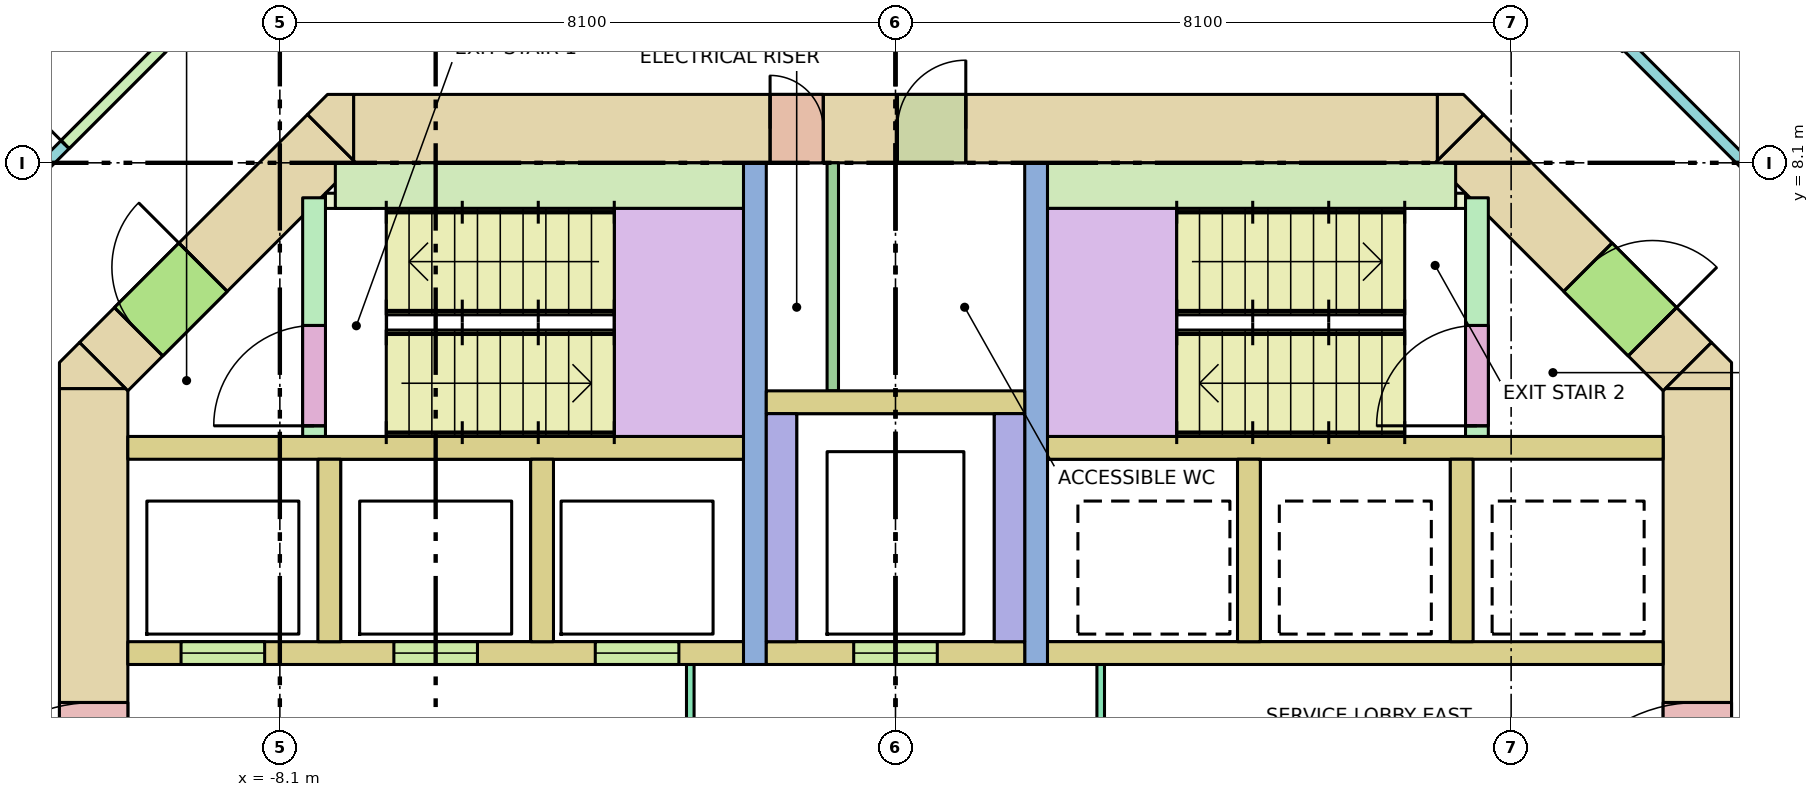
"""IFC4 building model, lengths in metres.
Left out: names, types, materials, properties, quantities, classifications, styles, units other than length and angle.
Written with IfcOpenShell. Run it as: python <this file> out.ifc"""

import sys

from ifc_helpers import new_model, si_unit, direction, frame, frame_2d, origin, place, context, subcontext, project, spatial, polyline, rectangle, outline, extrude, element, fill, save


model = new_model("IFC4")
c1 = context("Model", 3, precision=1e-05, world=origin(), true_north=direction((0.0, 1.0)))
c2 = subcontext(c1, "Body", "Model", "MODEL_VIEW")
j1 = project(units=[si_unit("LENGTHUNIT", "METRE"), si_unit("PLANEANGLEUNIT", "RADIAN")], contexts=[c1])
p1 = place(None, origin())
s1 = spatial("IfcSite", under=j1, at=p1, CompositionType="ELEMENT")
p2 = place(p1, origin())
s2 = spatial("IfcBuilding", under=s1, at=p2, CompositionType="ELEMENT")
p3 = place(p2, frame((0.0, 0.0, 139.0)))
s3 = spatial("IfcBuildingStorey", under=s2, at=p3, CompositionType="ELEMENT", Elevation=139.0)
p4 = place(p3, frame((-7.13, 8.55, -0.28), z_axis=(0.0, 0.0, 1.0), x_axis=(1.0, 0.0, 0.0)))
e1 = element("IfcWall", 1, at=p4, inside=s3, PredefinedType="SHEAR", context=c2, shape_type="SweptSolid", body=[
    extrude(rectangle(XDim=14.26, YDim=0.9, at=frame_2d((7.13, 0.0))), origin(), (0.0, 0.0, 1.0), 3.8),
])
p5 = place(p4, frame((5.48, 0.0, 0.28)))
e2 = element("IfcOpeningElement", 2, at=p5, cuts=e1, PredefinedType="OPENING", context=c2, shape_type="SweptSolid", body=[
    extrude(rectangle(XDim=0.7, YDim=2.1, at=frame_2d((0.35, 1.05))), frame((0.0, 0.46, 0.0), z_axis=(0.0, -1.0, 0.0), x_axis=(1.0, 0.0, 0.0)), (0.0, 0.0, 1.0), 0.92),
])
p6 = place(p4, frame((7.155, 0.0, 0.28)))
e3 = element("IfcOpeningElement", 3, at=p6, cuts=e1, PredefinedType="OPENING", context=c2, shape_type="SweptSolid", body=[
    extrude(rectangle(XDim=0.9, YDim=2.1, at=frame_2d((0.45, 1.05))), frame((0.0, 0.46, 0.0), z_axis=(0.0, -1.0, 0.0), x_axis=(1.0, 0.0, 0.0)), (0.0, 0.0, 1.0), 0.92),
])
p7 = place(p3, frame((-10.55, -5.13, -0.28), z_axis=(0.0, 0.0, 1.0), x_axis=(0.0, 1.0, 0.0)))
e4 = element("IfcWall", 4, at=p7, inside=s3, PredefinedType="SHEAR", context=c2, shape_type="SweptSolid", body=[
    extrude(rectangle(XDim=10.26, YDim=0.9, at=frame_2d((5.13, 0.0))), origin(), (0.0, 0.0, 1.0), 3.8),
])
p8 = place(p7, frame((4.13, 0.0, 0.28)))
e5 = element("IfcOpeningElement", 5, at=p8, cuts=e4, PredefinedType="OPENING", context=c2, shape_type="SweptSolid", body=[
    extrude(rectangle(XDim=2.0, YDim=2.1, at=frame_2d((1.0, 1.05))), frame((0.0, 0.46, 0.0), z_axis=(0.0, -1.0, 0.0), x_axis=(1.0, 0.0, 0.0)), (0.0, 0.0, 1.0), 0.92),
])
p9 = place(p3, frame((10.55, -5.13, -0.28), z_axis=(0.0, 0.0, 1.0), x_axis=(0.0, 1.0, 0.0)))
e6 = element("IfcWall", 6, at=p9, inside=s3, PredefinedType="SHEAR", context=c2, shape_type="SweptSolid", body=[
    extrude(rectangle(XDim=10.26, YDim=0.9, at=frame_2d((5.13, 0.0))), origin(), (0.0, 0.0, 1.0), 3.8),
])
p10 = place(p9, frame((4.13, 0.0, 0.28)))
e7 = element("IfcOpeningElement", 7, at=p10, cuts=e6, PredefinedType="OPENING", context=c2, shape_type="SweptSolid", body=[
    extrude(rectangle(XDim=2.0, YDim=2.1, at=frame_2d((1.0, 1.05))), frame((0.0, 0.46, 0.0), z_axis=(0.0, -1.0, 0.0), x_axis=(1.0, 0.0, 0.0)), (0.0, 0.0, 1.0), 0.92),
])
p11 = place(p3, frame((-10.418, 5.418, -0.28), z_axis=(0.0, 0.0, 1.0), x_axis=(0.707106781187, 0.707106781187, 0.0)))
e8 = element("IfcWall", 8, at=p11, inside=s3, PredefinedType="SHEAR", context=c2, shape_type="SweptSolid", body=[
    extrude(rectangle(XDim=4.243, YDim=0.9, at=frame_2d((2.121, 0.0))), origin(), (0.0, 0.0, 1.0), 3.8),
])
p12 = place(p11, frame((0.65, 0.0, 0.28)))
e9 = element("IfcOpeningElement", 9, at=p12, cuts=e8, PredefinedType="OPENING", context=c2, shape_type="SweptSolid", body=[
    extrude(rectangle(XDim=1.2, YDim=2.1, at=frame_2d((0.6, 1.05))), frame((0.0, 0.46, 0.0), z_axis=(0.0, -1.0, 0.0), x_axis=(1.0, 0.0, 0.0)), (0.0, 0.0, 1.0), 0.92),
])
p13 = place(p3, frame((7.418, 8.418, -0.28), z_axis=(0.0, 0.0, 1.0), x_axis=(0.707106781187, -0.707106781187, 0.0)))
e10 = element("IfcWall", 10, at=p13, inside=s3, PredefinedType="SHEAR", context=c2, shape_type="SweptSolid", body=[
    extrude(rectangle(XDim=4.243, YDim=0.9, at=frame_2d((2.121, 0.0))), origin(), (0.0, 0.0, 1.0), 3.8),
])
p14 = place(p13, frame((2.393, 0.0, 0.28)))
e11 = element("IfcOpeningElement", 11, at=p14, cuts=e10, PredefinedType="OPENING", context=c2, shape_type="SweptSolid", body=[
    extrude(rectangle(XDim=1.2, YDim=2.1, at=frame_2d((0.6, 1.05))), frame((0.0, 0.46, 0.0), z_axis=(0.0, -1.0, 0.0), x_axis=(1.0, 0.0, 0.0)), (0.0, 0.0, 1.0), 0.92),
])
p15 = place(p3, frame((0.0, 0.0, -0.28)))
e12 = element("IfcWall", 12, at=p15, inside=s3, PredefinedType="SHEAR", context=c2, shape_type="SweptSolid", body=[
    extrude(outline(polyline([(-10.736, 5.736), (-10.13, 5.13), (-11.0, 5.13), (-11.0, 5.473), (-10.736, 5.736)])), origin(), (0.0, 0.0, 1.0), 3.8),
])
p16 = place(p3, frame((0.0, 0.0, -0.28)))
e13 = element("IfcWall", 13, at=p16, inside=s3, PredefinedType="SHEAR", context=c2, shape_type="SweptSolid", body=[
    extrude(outline(polyline([(11.0, 5.473), (11.0, 5.13), (10.13, 5.13), (10.736, 5.736), (11.0, 5.473)])), origin(), (0.0, 0.0, 1.0), 3.8),
])
p17 = place(p3, frame((0.0, 0.0, -0.28)))
e14 = element("IfcWall", 14, at=p17, inside=s3, PredefinedType="SHEAR", context=c2, shape_type="SweptSolid", body=[
    extrude(outline(polyline([(-7.473, 9.0), (-7.13, 9.0), (-7.13, 8.13), (-7.736, 8.736), (-7.473, 9.0)])), origin(), (0.0, 0.0, 1.0), 3.8),
])
p18 = place(p3, frame((0.0, 0.0, -0.28)))
e15 = element("IfcWall", 15, at=p18, inside=s3, PredefinedType="SHEAR", context=c2, shape_type="SweptSolid", body=[
    extrude(outline(polyline([(7.473, 9.0), (7.736, 8.736), (7.13, 8.13), (7.13, 9.0), (7.473, 9.0)])), origin(), (0.0, 0.0, 1.0), 3.8),
])
for number, where, z_axis, x_axis in (
    (16, (-10.1, 4.35, 0.0), (0.0, 0.0, 1.0), (1.0, 0.0, 0.0)),
    (17, (2.0, 4.35, 0.0), (0.0, 0.0, 1.0), (1.0, 0.0, 0.0)),
):
    element("IfcWall", number, at=place(p3, frame(where, z_axis=z_axis, x_axis=x_axis)), inside=s3, PredefinedType="SOLIDWALL", context=c2, shape_type="SweptSolid", body=[
        extrude(rectangle(XDim=8.1, YDim=0.3, at=frame_2d((4.05, 0.0))), origin(), (0.0, 0.0, 1.0), 3.52),
    ])
p19 = place(p3, frame((-10.1, 1.65, 0.0), z_axis=(0.0, 0.0, 1.0), x_axis=(1.0, 0.0, 0.0)))
e18 = element("IfcWall", 18, at=p19, inside=s3, PredefinedType="SOLIDWALL", context=c2, shape_type="SweptSolid", body=[
    extrude(rectangle(XDim=8.1, YDim=0.3, at=frame_2d((4.05, 0.0))), origin(), (0.0, 0.0, 1.0), 3.52),
])
p20 = place(p19, frame((0.7, 0.0, 0.0)))
e19 = element("IfcOpeningElement", 19, at=p20, cuts=e18, PredefinedType="OPENING", context=c2, shape_type="SweptSolid", body=[
    extrude(rectangle(XDim=1.1, YDim=2.1, at=frame_2d((0.55, 1.05))), frame((0.0, 0.16, 0.0), z_axis=(0.0, -1.0, 0.0), x_axis=(1.0, 0.0, 0.0)), (0.0, 0.0, 1.0), 0.32),
])
p21 = place(p19, frame((3.5, 0.0, 0.0)))
e20 = element("IfcOpeningElement", 20, at=p21, cuts=e18, PredefinedType="OPENING", context=c2, shape_type="SweptSolid", body=[
    extrude(rectangle(XDim=1.1, YDim=2.1, at=frame_2d((0.55, 1.05))), frame((0.0, 0.16, 0.0), z_axis=(0.0, -1.0, 0.0), x_axis=(1.0, 0.0, 0.0)), (0.0, 0.0, 1.0), 0.32),
])
p22 = place(p19, frame((6.15, 0.0, 0.0)))
e21 = element("IfcOpeningElement", 21, at=p22, cuts=e18, PredefinedType="OPENING", context=c2, shape_type="SweptSolid", body=[
    extrude(rectangle(XDim=1.1, YDim=2.1, at=frame_2d((0.55, 1.05))), frame((0.0, 0.16, 0.0), z_axis=(0.0, -1.0, 0.0), x_axis=(1.0, 0.0, 0.0)), (0.0, 0.0, 1.0), 0.32),
])
p23 = place(p3, frame((2.0, 1.65, 0.0), z_axis=(0.0, 0.0, 1.0), x_axis=(1.0, 0.0, 0.0)))
e22 = element("IfcWall", 22, at=p23, inside=s3, PredefinedType="SOLIDWALL", context=c2, shape_type="SweptSolid", body=[
    extrude(rectangle(XDim=8.1, YDim=0.3, at=frame_2d((4.05, 0.0))), origin(), (0.0, 0.0, 1.0), 3.52),
])
for number, where, z_axis, x_axis in (
    (23, (-7.45, 1.8, 0.0), (0.0, 0.0, 1.0), (0.0, 1.0, 0.0)),
    (24, (-4.65, 1.8, 0.0), (0.0, 0.0, 1.0), (0.0, 1.0, 0.0)),
    (25, (4.65, 1.8, 0.0), (0.0, 0.0, 1.0), (0.0, 1.0, 0.0)),
    (26, (7.45, 1.8, 0.0), (0.0, 0.0, 1.0), (0.0, 1.0, 0.0)),
):
    element("IfcWall", number, at=place(p3, frame(where, z_axis=z_axis, x_axis=x_axis)), inside=s3, PredefinedType="SOLIDWALL", context=c2, shape_type="SweptSolid", body=[
        extrude(rectangle(XDim=2.4, YDim=0.3, at=frame_2d((1.2, 0.0))), origin(), (0.0, 0.0, 1.0), 3.52),
    ])
for number, where, z_axis, x_axis in (
    (27, (-1.85, 1.5, 0.0), (0.0, 0.0, 1.0), (0.0, 1.0, 0.0)),
    (28, (1.85, 1.5, 0.0), (0.0, 0.0, 1.0), (0.0, 1.0, 0.0)),
):
    element("IfcWall", number, at=place(p3, frame(where, z_axis=z_axis, x_axis=x_axis)), inside=s3, PredefinedType="SHEAR", context=c2, shape_type="SweptSolid", body=[
        extrude(rectangle(XDim=6.6, YDim=0.3, at=frame_2d((3.3, 0.0))), origin(), (0.0, 0.0, 1.0), 3.52),
    ])
p24 = place(p3, frame((-1.7, 1.65, 0.0), z_axis=(0.0, 0.0, 1.0), x_axis=(1.0, 0.0, 0.0)))
e29 = element("IfcWall", 29, at=p24, inside=s3, PredefinedType="SOLIDWALL", context=c2, shape_type="SweptSolid", body=[
    extrude(rectangle(XDim=3.4, YDim=0.3, at=frame_2d((1.7, 0.0))), origin(), (0.0, 0.0, 1.0), 3.52),
])
p25 = place(p24, frame((1.15, 0.0, 0.0)))
e30 = element("IfcOpeningElement", 30, at=p25, cuts=e29, PredefinedType="OPENING", context=c2, shape_type="SweptSolid", body=[
    extrude(rectangle(XDim=1.1, YDim=2.1, at=frame_2d((0.55, 1.05))), frame((0.0, 0.16, 0.0), z_axis=(0.0, -1.0, 0.0), x_axis=(1.0, 0.0, 0.0)), (0.0, 0.0, 1.0), 0.32),
])
for number, where, z_axis, x_axis in (
    (31, (-1.5, 1.8, 0.0), (0.0, 0.0, 1.0), (0.0, 1.0, 0.0)),
    (32, (1.5, 1.8, 0.0), (0.0, 0.0, 1.0), (0.0, 1.0, 0.0)),
):
    element("IfcWall", number, at=place(p3, frame(where, z_axis=z_axis, x_axis=x_axis)), inside=s3, PredefinedType="SOLIDWALL", context=c2, shape_type="SweptSolid", body=[
        extrude(rectangle(XDim=3.0, YDim=0.4, at=frame_2d((1.5, 0.0))), origin(), (0.0, 0.0, 1.0), 3.52),
    ])
p26 = place(p3, frame((-1.7, 4.95, 0.0), z_axis=(0.0, 0.0, 1.0), x_axis=(1.0, 0.0, 0.0)))
e33 = element("IfcWall", 33, at=p26, inside=s3, PredefinedType="SOLIDWALL", context=c2, shape_type="SweptSolid", body=[
    extrude(rectangle(XDim=3.4, YDim=0.3, at=frame_2d((1.7, 0.0))), origin(), (0.0, 0.0, 1.0), 3.52),
])
p27 = place(p3, frame((-7.65, 4.5, 0.0), z_axis=(0.0, 0.0, 1.0), x_axis=(0.0, 1.0, 0.0)))
e34 = element("IfcWall", 34, at=p27, inside=s3, PredefinedType="SHEAR", context=c2, shape_type="SweptSolid", body=[
    extrude(rectangle(XDim=3.14, YDim=0.3, at=frame_2d((1.57, 0.0))), origin(), (0.0, 0.0, 1.0), 3.52),
])
p28 = place(p27, frame((0.14, 0.0, 0.0)))
e35 = element("IfcOpeningElement", 35, at=p28, cuts=e34, PredefinedType="OPENING", context=c2, shape_type="SweptSolid", body=[
    extrude(rectangle(XDim=1.32, YDim=2.1, at=frame_2d((0.66, 1.05))), frame((0.0, 0.16, 0.0), z_axis=(0.0, -1.0, 0.0), x_axis=(1.0, 0.0, 0.0)), (0.0, 0.0, 1.0), 0.32),
])
p29 = place(p3, frame((-7.37, 7.8, 0.0), z_axis=(0.0, 0.0, 1.0), x_axis=(1.0, 0.0, 0.0)))
e36 = element("IfcWall", 36, at=p29, inside=s3, PredefinedType="SHEAR", context=c2, shape_type="SweptSolid", body=[
    extrude(rectangle(XDim=5.37, YDim=0.6, at=frame_2d((2.685, 0.0))), origin(), (0.0, 0.0, 1.0), 3.52),
])
p30 = place(p3, frame((7.65, 4.5, 0.0), z_axis=(0.0, 0.0, 1.0), x_axis=(0.0, 1.0, 0.0)))
e37 = element("IfcWall", 37, at=p30, inside=s3, PredefinedType="SHEAR", context=c2, shape_type="SweptSolid", body=[
    extrude(rectangle(XDim=3.14, YDim=0.3, at=frame_2d((1.57, 0.0))), origin(), (0.0, 0.0, 1.0), 3.52),
])
p31 = place(p30, frame((0.14, 0.0, 0.0)))
e38 = element("IfcOpeningElement", 38, at=p31, cuts=e37, PredefinedType="OPENING", context=c2, shape_type="SweptSolid", body=[
    extrude(rectangle(XDim=1.32, YDim=2.1, at=frame_2d((0.66, 1.05))), frame((0.0, 0.16, 0.0), z_axis=(0.0, -1.0, 0.0), x_axis=(1.0, 0.0, 0.0)), (0.0, 0.0, 1.0), 0.32),
])
p32 = place(p3, frame((2.0, 7.8, 0.0), z_axis=(0.0, 0.0, 1.0), x_axis=(1.0, 0.0, 0.0)))
e39 = element("IfcWall", 39, at=p32, inside=s3, PredefinedType="SHEAR", context=c2, shape_type="SweptSolid", body=[
    extrude(rectangle(XDim=5.37, YDim=0.6, at=frame_2d((2.685, 0.0))), origin(), (0.0, 0.0, 1.0), 3.52),
])
for number, where, z_axis, x_axis in (
    (40, (-7.5, 7.6, 0.0), (0.0, 0.0, 1.0), (1.0, 0.0, 0.0)),
    (41, (6.9, 7.6, 0.0), (0.0, 0.0, 1.0), (1.0, 0.0, 0.0)),
):
    element("IfcWall", number, at=place(p3, frame(where, z_axis=z_axis, x_axis=x_axis)), inside=s3, PredefinedType="SHEAR", context=c2, shape_type="SweptSolid", body=[
        extrude(rectangle(XDim=0.6, YDim=0.2, at=frame_2d((0.3, 0.0))), origin(), (0.0, 0.0, 1.0), 3.52),
    ])
p33 = place(p3, frame((-2.7, -1.5, 0.0), z_axis=(0.0, 0.0, 1.0), x_axis=(0.0, 1.0, 0.0)))
e42 = element("IfcWall", 42, at=p33, inside=s3, PredefinedType="PARTITIONING", context=c2, shape_type="SweptSolid", body=[
    extrude(rectangle(XDim=3.0, YDim=0.1, at=frame_2d((1.5, 0.0))), origin(), (0.0, 0.0, 1.0), 3.52),
])
p34 = place(p33, frame((0.9, 0.0, 0.0)))
e43 = element("IfcOpeningElement", 43, at=p34, cuts=e42, PredefinedType="OPENING", context=c2, shape_type="SweptSolid", body=[
    extrude(rectangle(XDim=1.2, YDim=2.1, at=frame_2d((0.6, 1.05))), frame((0.0, 0.06, 0.0), z_axis=(0.0, -1.0, 0.0), x_axis=(1.0, 0.0, 0.0)), (0.0, 0.0, 1.0), 0.12),
])
p35 = place(p3, frame((2.7, -1.5, 0.0), z_axis=(0.0, 0.0, 1.0), x_axis=(0.0, 1.0, 0.0)))
e44 = element("IfcWall", 44, at=p35, inside=s3, PredefinedType="PARTITIONING", context=c2, shape_type="SweptSolid", body=[
    extrude(rectangle(XDim=3.0, YDim=0.1, at=frame_2d((1.5, 0.0))), origin(), (0.0, 0.0, 1.0), 3.52),
])
p36 = place(p35, frame((0.9, 0.0, 0.0)))
e45 = element("IfcOpeningElement", 45, at=p36, cuts=e44, PredefinedType="OPENING", context=c2, shape_type="SweptSolid", body=[
    extrude(rectangle(XDim=1.2, YDim=2.1, at=frame_2d((0.6, 1.05))), frame((0.0, 0.06, 0.0), z_axis=(0.0, -1.0, 0.0), x_axis=(1.0, 0.0, 0.0)), (0.0, 0.0, 1.0), 0.12),
])
p37 = place(p3, frame((-0.825, 5.1, 0.0), z_axis=(0.0, 0.0, 1.0), x_axis=(0.0, 1.0, 0.0)))
e46 = element("IfcWall", 46, at=p37, inside=s3, PredefinedType="PARTITIONING", context=c2, shape_type="SweptSolid", body=[
    extrude(rectangle(XDim=3.0, YDim=0.15, at=frame_2d((1.5, 0.0))), origin(), (0.0, 0.0, 1.0), 3.52),
])
p38 = place(p3, frame((-12.975, 6.291, 0.0), z_axis=(0.0, 0.0, 1.0), x_axis=(0.707125355289, 0.707088206597, 0.0)))
e47 = element("IfcWall", 47, at=p38, inside=s3, PredefinedType="PARTITIONING", context=c2, shape_type="SweptSolid", body=[
    extrude(rectangle(XDim=6.572, YDim=0.15, at=frame_2d((3.286, 0.0))), origin(), (0.0, 0.0, 1.0), 2.67),
])
p39 = place(p38, frame((2.898, 0.0, 0.0)))
e48 = element("IfcOpeningElement", 48, at=p39, cuts=e47, PredefinedType="OPENING", context=c2, shape_type="SweptSolid", body=[
    extrude(rectangle(XDim=1.8, YDim=2.1, at=frame_2d((0.9, 1.05))), frame((0.0, 0.085, 0.0), z_axis=(0.0, -1.0, 0.0), x_axis=(1.0, 0.0, 0.0)), (0.0, 0.0, 1.0), 0.17),
])
p40 = place(p3, frame((9.633, 9.633, 0.0), z_axis=(0.0, 0.0, 1.0), x_axis=(0.707106781187, -0.707106781187, 0.0)))
e49 = element("IfcWall", 49, at=p40, inside=s3, PredefinedType="PARTITIONING", context=c2, shape_type="SweptSolid", body=[
    extrude(rectangle(XDim=2.335, YDim=0.15, at=frame_2d((1.168, 0.0))), origin(), (0.0, 0.0, 1.0), 2.67),
])
p41 = place(p20, origin())
e50 = element("IfcDoor", 50, at=p41, inside=s3, OperationType="DOUBLE_DOOR_SLIDING", PredefinedType="DOOR", context=c2, shape_type="SweptSolid", body=[
    extrude(rectangle(XDim=1.1, YDim=2.1, at=frame_2d((0.55, 1.05))), frame((0.0, 0.025, 0.0), z_axis=(0.0, -1.0, 0.0), x_axis=(1.0, 0.0, 0.0)), (0.0, 0.0, 1.0), 0.05),
])
fill(e19, e50)
p42 = place(p21, origin())
e51 = element("IfcDoor", 51, at=p42, inside=s3, OperationType="DOUBLE_DOOR_SLIDING", PredefinedType="DOOR", context=c2, shape_type="SweptSolid", body=[
    extrude(rectangle(XDim=1.1, YDim=2.1, at=frame_2d((0.55, 1.05))), frame((0.0, 0.025, 0.0), z_axis=(0.0, -1.0, 0.0), x_axis=(1.0, 0.0, 0.0)), (0.0, 0.0, 1.0), 0.05),
])
fill(e20, e51)
p43 = place(p22, origin())
e52 = element("IfcDoor", 52, at=p43, inside=s3, OperationType="DOUBLE_DOOR_SLIDING", PredefinedType="DOOR", context=c2, shape_type="SweptSolid", body=[
    extrude(rectangle(XDim=1.1, YDim=2.1, at=frame_2d((0.55, 1.05))), frame((0.0, 0.025, 0.0), z_axis=(0.0, -1.0, 0.0), x_axis=(1.0, 0.0, 0.0)), (0.0, 0.0, 1.0), 0.05),
])
fill(e21, e52)
p44 = place(p25, origin())
e53 = element("IfcDoor", 53, at=p44, inside=s3, OperationType="DOUBLE_DOOR_SLIDING", PredefinedType="DOOR", context=c2, shape_type="SweptSolid", body=[
    extrude(rectangle(XDim=1.1, YDim=2.1, at=frame_2d((0.55, 1.05))), frame((0.0, 0.025, 0.0), z_axis=(0.0, -1.0, 0.0), x_axis=(1.0, 0.0, 0.0)), (0.0, 0.0, 1.0), 0.05),
])
fill(e30, e53)
p45 = place(p28, origin())
e54 = element("IfcDoor", 54, at=p45, inside=s3, OperationType="DOUBLE_DOOR_SINGLE_SWING", PredefinedType="DOOR", context=c2, shape_type="SweptSolid", body=[
    extrude(rectangle(XDim=1.32, YDim=2.1, at=frame_2d((0.66, 1.05))), frame((0.0, 0.025, 0.0), z_axis=(0.0, -1.0, 0.0), x_axis=(1.0, 0.0, 0.0)), (0.0, 0.0, 1.0), 0.05),
])
fill(e35, e54)
p46 = place(p12, origin())
e55 = element("IfcDoor", 55, at=p46, inside=s3, OperationType="SINGLE_SWING_RIGHT", PredefinedType="DOOR", context=c2, shape_type="SweptSolid", body=[
    extrude(rectangle(XDim=1.2, YDim=2.1, at=frame_2d((0.6, 1.05))), frame((0.0, 0.025, 0.0), z_axis=(0.0, -1.0, 0.0), x_axis=(1.0, 0.0, 0.0)), (0.0, 0.0, 1.0), 0.05),
])
fill(e9, e55)
p47 = place(p31, origin())
e56 = element("IfcDoor", 56, at=p47, inside=s3, OperationType="DOUBLE_DOOR_SINGLE_SWING", PredefinedType="DOOR", context=c2, shape_type="SweptSolid", body=[
    extrude(rectangle(XDim=1.32, YDim=2.1, at=frame_2d((0.66, 1.05))), frame((0.0, 0.025, 0.0), z_axis=(0.0, -1.0, 0.0), x_axis=(1.0, 0.0, 0.0)), (0.0, 0.0, 1.0), 0.05),
])
fill(e38, e56)
p48 = place(p14, origin())
e57 = element("IfcDoor", 57, at=p48, inside=s3, OperationType="SINGLE_SWING_RIGHT", PredefinedType="DOOR", context=c2, shape_type="SweptSolid", body=[
    extrude(rectangle(XDim=1.2, YDim=2.1, at=frame_2d((0.6, 1.05))), frame((0.0, 0.025, 0.0), z_axis=(0.0, -1.0, 0.0), x_axis=(1.0, 0.0, 0.0)), (0.0, 0.0, 1.0), 0.05),
])
fill(e11, e57)
p49 = place(p8, origin())
e58 = element("IfcDoor", 58, at=p49, inside=s3, OperationType="DOUBLE_DOOR_SINGLE_SWING", PredefinedType="DOOR", context=c2, shape_type="SweptSolid", body=[
    extrude(rectangle(XDim=2.0, YDim=2.1, at=frame_2d((1.0, 1.05))), frame((0.0, 0.025, 0.0), z_axis=(0.0, -1.0, 0.0), x_axis=(1.0, 0.0, 0.0)), (0.0, 0.0, 1.0), 0.05),
])
fill(e5, e58)
p50 = place(p10, origin())
e59 = element("IfcDoor", 59, at=p50, inside=s3, OperationType="DOUBLE_DOOR_SINGLE_SWING", PredefinedType="DOOR", context=c2, shape_type="SweptSolid", body=[
    extrude(rectangle(XDim=2.0, YDim=2.1, at=frame_2d((1.0, 1.05))), frame((0.0, 0.025, 0.0), z_axis=(0.0, -1.0, 0.0), x_axis=(1.0, 0.0, 0.0)), (0.0, 0.0, 1.0), 0.05),
])
fill(e7, e59)
p51 = place(p5, origin())
e60 = element("IfcDoor", 60, at=p51, inside=s3, OperationType="SINGLE_SWING_LEFT", PredefinedType="DOOR", context=c2, shape_type="SweptSolid", body=[
    extrude(rectangle(XDim=0.7, YDim=2.1, at=frame_2d((0.35, 1.05))), frame((0.0, 0.025, 0.0), z_axis=(0.0, -1.0, 0.0), x_axis=(1.0, 0.0, 0.0)), (0.0, 0.0, 1.0), 0.05),
])
fill(e2, e60)
p52 = place(p6, origin())
e61 = element("IfcDoor", 61, at=p52, inside=s3, OperationType="SINGLE_SWING_RIGHT", PredefinedType="DOOR", context=c2, shape_type="SweptSolid", body=[
    extrude(rectangle(XDim=0.9, YDim=2.1, at=frame_2d((0.45, 1.05))), frame((0.0, 0.025, 0.0), z_axis=(0.0, -1.0, 0.0), x_axis=(1.0, 0.0, 0.0)), (0.0, 0.0, 1.0), 0.05),
])
fill(e3, e61)
p53 = place(p39, origin())
e62 = element("IfcDoor", 62, at=p53, inside=s3, OperationType="DOUBLE_DOOR_SINGLE_SWING", PredefinedType="DOOR", context=c2, shape_type="SweptSolid", body=[
    extrude(rectangle(XDim=1.8, YDim=2.1, at=frame_2d((0.9, 1.05))), frame((0.0, 0.025, 0.0), z_axis=(0.0, -1.0, 0.0), x_axis=(1.0, 0.0, 0.0)), (0.0, 0.0, 1.0), 0.05),
])
fill(e48, e62)
save(model, sys.argv[1])
